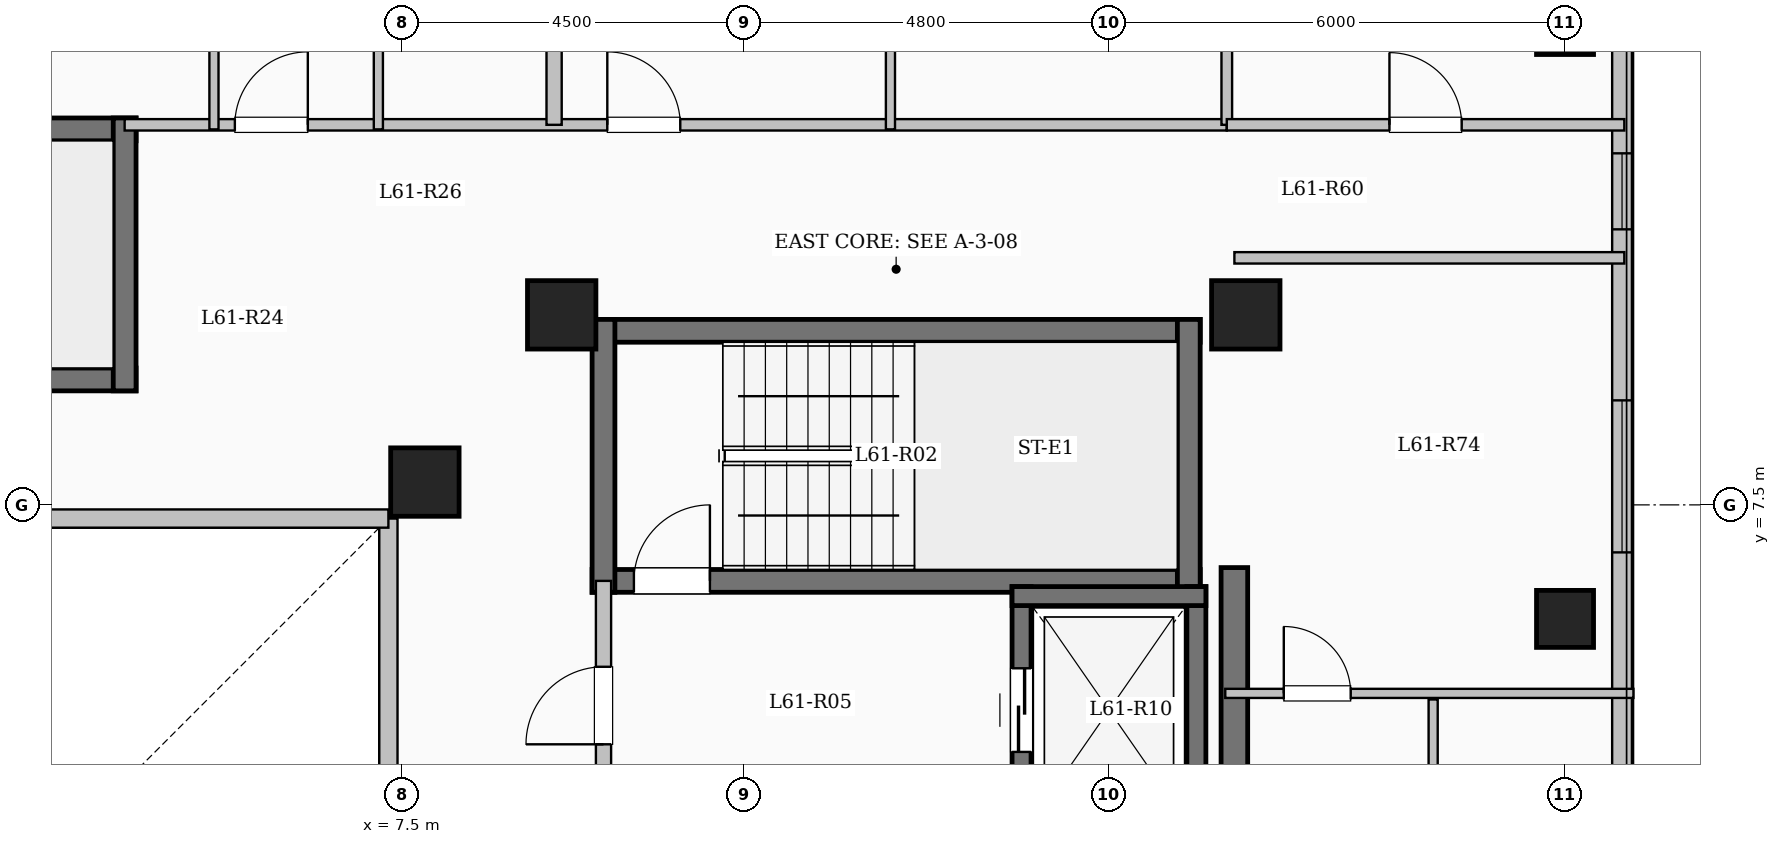
"""IFC4 building model, lengths in metres.
Left out: names, types, materials, properties, quantities, classifications, styles, units other than length and angle.
Written with IfcOpenShell. Run it as: python <this file> out.ifc"""

import sys

from ifc_helpers import new_model, si_unit, direction, frame, frame_2d, origin, origin_2d, place, context, subcontext, project, spatial, rectangle, extrude, element, fill, save


model = new_model("IFC4")
c1 = context("Model", 3, precision=1e-05, world=origin(), true_north=direction((0.0, 1.0)))
c2 = subcontext(c1, "Body", "Model", "MODEL_VIEW")
j1 = project(units=[si_unit("LENGTHUNIT", "METRE"), si_unit("PLANEANGLEUNIT", "RADIAN")], contexts=[c1])
p1 = place(None, origin())
s1 = spatial("IfcSite", under=j1, at=p1, CompositionType="ELEMENT")
p2 = place(p1, origin())
s2 = spatial("IfcBuilding", under=s1, at=p2, CompositionType="ELEMENT")
p3 = place(p2, frame((0.0, 0.0, 223.75)))
s3 = spatial("IfcBuildingStorey", under=s2, at=p3, CompositionType="ELEMENT", Elevation=223.75)
for number, where, z_axis, x_axis in (
    (1, (7.8, 7.8, 0.0), (0.0, 0.0, 1.0), (1.0, 0.0, 0.0)),
    (2, (9.6, 10.0, 0.0), (0.0, 0.0, 1.0), (1.0, 0.0, 0.0)),
    (3, (18.6, 10.0, 0.0), (0.0, 0.0, 1.0), (1.0, 0.0, 0.0)),
):
    element("IfcColumn", number, at=place(p3, frame(where, z_axis=z_axis, x_axis=x_axis)), inside=s3, PredefinedType="COLUMN", context=c2, shape_type="SweptSolid", body=[
        extrude(rectangle(XDim=0.9, YDim=0.9, at=origin_2d()), origin(), (0.0, 0.0, 1.0), 3.35),
    ])
for number, where, z_axis, x_axis in (
    (4, (22.8, 6.0, 0.0), (0.0, 0.0, 1.0), (1.0, 0.0, 0.0)),
    (5, (22.8, 13.8, 0.0), (0.0, 0.0, 1.0), (1.0, 0.0, 0.0)),
):
    element("IfcColumn", number, at=place(p3, frame(where, z_axis=z_axis, x_axis=x_axis)), inside=s3, PredefinedType="COLUMN", context=c2, shape_type="SweptSolid", body=[
        extrude(rectangle(XDim=0.75, YDim=0.75, at=origin_2d()), origin(), (0.0, 0.0, 1.0), 3.35),
    ])
p4 = place(p3, frame((7.32, -7.32, 0.0), z_axis=(0.0, 0.0, 1.0), x_axis=(0.0, 1.0, 0.0)))
e6 = element("IfcWall", 6, at=p4, inside=s3, PredefinedType="SOLIDWALL", context=c2, shape_type="SweptSolid", body=[
    extrude(rectangle(XDim=14.64, YDim=0.24, at=frame_2d((7.32, 0.0))), origin(), (0.0, 0.0, 1.0), 3.05),
])
p5 = place(p4, frame((6.62, 0.0, 0.95)))
e7 = element("IfcOpeningElement", 7, at=p5, cuts=e6, PredefinedType="OPENING", context=c2, shape_type="SweptSolid", body=[
    extrude(rectangle(XDim=1.4, YDim=1.5, at=frame_2d((0.7, 0.75))), frame((0.0, 0.13, 0.0), z_axis=(0.0, -1.0, 0.0), x_axis=(1.0, 0.0, 0.0)), (0.0, 0.0, 1.0), 0.26),
])
p6 = place(p3, frame((7.32, 7.32, 0.0), z_axis=(0.0, 0.0, 1.0), x_axis=(-1.0, 0.0, 0.0)))
e8 = element("IfcWall", 8, at=p6, inside=s3, PredefinedType="SOLIDWALL", context=c2, shape_type="SweptSolid", body=[
    extrude(rectangle(XDim=14.64, YDim=0.24, at=frame_2d((7.32, 0.0))), origin(), (0.0, 0.0, 1.0), 3.05),
])
p7 = place(p6, frame((6.62, 0.0, 0.95)))
e9 = element("IfcOpeningElement", 9, at=p7, cuts=e8, PredefinedType="OPENING", context=c2, shape_type="SweptSolid", body=[
    extrude(rectangle(XDim=1.4, YDim=1.5, at=frame_2d((0.7, 0.75))), frame((0.0, 0.13, 0.0), z_axis=(0.0, -1.0, 0.0), x_axis=(1.0, 0.0, 0.0)), (0.0, 0.0, 1.0), 0.26),
])
p8 = place(p3, frame((23.55, 17.25, 0.0), z_axis=(0.0, 0.0, 1.0), x_axis=(0.0, -1.0, 0.0)))
e10 = element("IfcWall", 10, at=p8, inside=s3, PredefinedType="SOLIDWALL", context=c2, shape_type="SweptSolid", body=[
    extrude(rectangle(XDim=34.5, YDim=0.26, at=frame_2d((17.25, 0.0))), origin(), (0.0, 0.0, 1.0), 3.05),
])
p9 = place(p8, frame((1.375, 0.0, 0.9)))
e11 = element("IfcOpeningElement", 11, at=p9, cuts=e10, PredefinedType="OPENING", context=c2, shape_type="SweptSolid", body=[
    extrude(rectangle(XDim=2.0, YDim=1.7, at=frame_2d((1.0, 0.85))), frame((0.0, 0.14, 0.0), z_axis=(0.0, -1.0, 0.0), x_axis=(1.0, 0.0, 0.0)), (0.0, 0.0, 1.0), 0.28),
])
p10 = place(p8, frame((5.125, 0.0, 0.95)))
e12 = element("IfcOpeningElement", 12, at=p10, cuts=e10, PredefinedType="OPENING", context=c2, shape_type="SweptSolid", body=[
    extrude(rectangle(XDim=1.0, YDim=1.5, at=frame_2d((0.5, 0.75))), frame((0.0, 0.14, 0.0), z_axis=(0.0, -1.0, 0.0), x_axis=(1.0, 0.0, 0.0)), (0.0, 0.0, 1.0), 0.28),
])
p11 = place(p8, frame((8.375, 0.0, 0.9)))
e13 = element("IfcOpeningElement", 13, at=p11, cuts=e10, PredefinedType="OPENING", context=c2, shape_type="SweptSolid", body=[
    extrude(rectangle(XDim=2.0, YDim=1.7, at=frame_2d((1.0, 0.85))), frame((0.0, 0.14, 0.0), z_axis=(0.0, -1.0, 0.0), x_axis=(1.0, 0.0, 0.0)), (0.0, 0.0, 1.0), 0.28),
])
p12 = place(p8, frame((13.2, 0.0, 0.9)))
e14 = element("IfcOpeningElement", 14, at=p12, cuts=e10, PredefinedType="OPENING", context=c2, shape_type="SweptSolid", body=[
    extrude(rectangle(XDim=1.65, YDim=1.6, at=frame_2d((0.825, 0.8))), frame((0.0, 0.14, 0.0), z_axis=(0.0, -1.0, 0.0), x_axis=(1.0, 0.0, 0.0)), (0.0, 0.0, 1.0), 0.28),
])
p13 = place(p8, frame((19.05, 0.0, 0.9)))
e15 = element("IfcOpeningElement", 15, at=p13, cuts=e10, PredefinedType="OPENING", context=c2, shape_type="SweptSolid", body=[
    extrude(rectangle(XDim=2.2, YDim=1.75, at=frame_2d((1.1, 0.875))), frame((0.0, 0.14, 0.0), z_axis=(0.0, -1.0, 0.0), x_axis=(1.0, 0.0, 0.0)), (0.0, 0.0, 1.0), 0.28),
])
p14 = place(p8, frame((24.975, 0.0, 0.95)))
e16 = element("IfcOpeningElement", 16, at=p14, cuts=e10, PredefinedType="OPENING", context=c2, shape_type="SweptSolid", body=[
    extrude(rectangle(XDim=1.2, YDim=1.5, at=frame_2d((0.6, 0.75))), frame((0.0, 0.14, 0.0), z_axis=(0.0, -1.0, 0.0), x_axis=(1.0, 0.0, 0.0)), (0.0, 0.0, 1.0), 0.28),
])
p15 = place(p8, frame((29.475, 0.0, 0.9)))
e17 = element("IfcOpeningElement", 17, at=p15, cuts=e10, PredefinedType="OPENING", context=c2, shape_type="SweptSolid", body=[
    extrude(rectangle(XDim=2.2, YDim=1.75, at=frame_2d((1.1, 0.875))), frame((0.0, 0.14, 0.0), z_axis=(0.0, -1.0, 0.0), x_axis=(1.0, 0.0, 0.0)), (0.0, 0.0, 1.0), 0.28),
])
p16 = place(p3, frame((10.0, 9.79, 0.0), z_axis=(0.0, 0.0, 1.0), x_axis=(1.0, 0.0, 0.0)))
e18 = element("IfcWall", 18, at=p16, inside=s3, PredefinedType="SHEAR", context=c2, shape_type="SweptSolid", body=[
    extrude(rectangle(XDim=8.0, YDim=0.3, at=frame_2d((4.0, 0.0))), origin(), (0.0, 0.0, 1.0), 3.35),
])
p17 = place(p3, frame((10.0, 6.5, 0.0), z_axis=(0.0, 0.0, 1.0), x_axis=(1.0, 0.0, 0.0)))
e19 = element("IfcWall", 19, at=p17, inside=s3, PredefinedType="SHEAR", context=c2, shape_type="SweptSolid", body=[
    extrude(rectangle(XDim=8.0, YDim=0.3, at=frame_2d((4.0, 0.0))), origin(), (0.0, 0.0, 1.0), 3.35),
])
p18 = place(p17, frame((0.55, 0.0, 0.0)))
e20 = element("IfcOpeningElement", 20, at=p18, cuts=e19, PredefinedType="OPENING", context=c2, shape_type="SweptSolid", body=[
    extrude(rectangle(XDim=1.0, YDim=2.15, at=frame_2d((0.5, 1.075))), frame((0.0, 0.16, 0.0), z_axis=(0.0, -1.0, 0.0), x_axis=(1.0, 0.0, 0.0)), (0.0, 0.0, 1.0), 0.32),
])
for number, where, z_axis, x_axis in (
    (21, (10.15, 6.35, 0.0), (0.0, 0.0, 1.0), (0.0, 1.0, 0.0)),
    (22, (17.85, 6.35, 0.0), (0.0, 0.0, 1.0), (0.0, 1.0, 0.0)),
):
    element("IfcWall", number, at=place(p3, frame(where, z_axis=z_axis, x_axis=x_axis)), inside=s3, PredefinedType="SHEAR", context=c2, shape_type="SweptSolid", body=[
        extrude(rectangle(XDim=3.59, YDim=0.3, at=frame_2d((1.795, 0.0))), origin(), (0.0, 0.0, 1.0), 3.35),
    ])
p19 = place(p3, frame((-4.0, 12.44, 0.0), z_axis=(0.0, 0.0, 1.0), x_axis=(1.0, 0.0, 0.0)))
e23 = element("IfcWall", 23, at=p19, inside=s3, PredefinedType="SHEAR", context=c2, shape_type="SweptSolid", body=[
    extrude(rectangle(XDim=8.0, YDim=0.3, at=frame_2d((4.0, 0.0))), origin(), (0.0, 0.0, 1.0), 3.35),
])
p20 = place(p3, frame((-4.0, 9.15, 0.0), z_axis=(0.0, 0.0, 1.0), x_axis=(1.0, 0.0, 0.0)))
e24 = element("IfcWall", 24, at=p20, inside=s3, PredefinedType="SHEAR", context=c2, shape_type="SweptSolid", body=[
    extrude(rectangle(XDim=8.0, YDim=0.3, at=frame_2d((4.0, 0.0))), origin(), (0.0, 0.0, 1.0), 3.35),
])
p21 = place(p20, frame((0.55, 0.0, 0.0)))
e25 = element("IfcOpeningElement", 25, at=p21, cuts=e24, PredefinedType="OPENING", context=c2, shape_type="SweptSolid", body=[
    extrude(rectangle(XDim=1.0, YDim=2.15, at=frame_2d((0.5, 1.075))), frame((0.0, 0.16, 0.0), z_axis=(0.0, -1.0, 0.0), x_axis=(1.0, 0.0, 0.0)), (0.0, 0.0, 1.0), 0.32),
])
p22 = place(p3, frame((3.85, 9.0, 0.0), z_axis=(0.0, 0.0, 1.0), x_axis=(0.0, 1.0, 0.0)))
e26 = element("IfcWall", 26, at=p22, inside=s3, PredefinedType="SHEAR", context=c2, shape_type="SweptSolid", body=[
    extrude(rectangle(XDim=3.59, YDim=0.3, at=frame_2d((1.795, 0.0))), origin(), (0.0, 0.0, 1.0), 3.35),
])
p23 = place(p3, frame((10.15, 3.25, 0.0), z_axis=(0.0, 0.0, 1.0), x_axis=(0.0, 1.0, 0.0)))
e27 = element("IfcWall", 27, at=p23, inside=s3, PredefinedType="SOLIDWALL", context=c2, shape_type="SweptSolid", body=[
    extrude(rectangle(XDim=3.25, YDim=0.2, at=frame_2d((1.625, 0.0))), origin(), (0.0, 0.0, 1.0), 3.05),
])
p24 = place(p23, frame((1.1, 0.0, 0.0)))
e28 = element("IfcOpeningElement", 28, at=p24, cuts=e27, PredefinedType="OPENING", context=c2, shape_type="SweptSolid", body=[
    extrude(rectangle(XDim=1.02, YDim=2.15, at=frame_2d((0.51, 1.075))), frame((0.0, 0.11, 0.0), z_axis=(0.0, -1.0, 0.0), x_axis=(1.0, 0.0, 0.0)), (0.0, 0.0, 1.0), 0.22),
])
p25 = place(p3, frame((15.65, 3.175, 0.0), z_axis=(0.0, 0.0, 1.0), x_axis=(0.0, 1.0, 0.0)))
e29 = element("IfcWall", 29, at=p25, inside=s3, PredefinedType="SHEAR", context=c2, shape_type="SweptSolid", body=[
    extrude(rectangle(XDim=3.25, YDim=0.25, at=frame_2d((1.625, 0.0))), origin(), (0.0, 0.0, 1.0), 3.35),
])
p26 = place(p25, frame((1.075, 0.0, 0.0)))
e30 = element("IfcOpeningElement", 30, at=p26, cuts=e29, PredefinedType="OPENING", context=c2, shape_type="SweptSolid", body=[
    extrude(rectangle(XDim=1.1, YDim=2.15, at=frame_2d((0.55, 1.075))), frame((0.0, 0.135, 0.0), z_axis=(0.0, -1.0, 0.0), x_axis=(1.0, 0.0, 0.0)), (0.0, 0.0, 1.0), 0.27),
])
p27 = place(p3, frame((17.95, 3.175, 0.0), z_axis=(0.0, 0.0, 1.0), x_axis=(0.0, 1.0, 0.0)))
e31 = element("IfcWall", 31, at=p27, inside=s3, PredefinedType="SHEAR", context=c2, shape_type="SweptSolid", body=[
    extrude(rectangle(XDim=3.25, YDim=0.25, at=frame_2d((1.625, 0.0))), origin(), (0.0, 0.0, 1.0), 3.35),
])
p28 = place(p3, frame((15.525, 6.3, 0.0), z_axis=(0.0, 0.0, 1.0), x_axis=(1.0, 0.0, 0.0)))
e32 = element("IfcWall", 32, at=p28, inside=s3, PredefinedType="SHEAR", context=c2, shape_type="SweptSolid", body=[
    extrude(rectangle(XDim=2.55, YDim=0.25, at=frame_2d((1.275, 0.0))), origin(), (0.0, 0.0, 1.0), 3.35),
])
p29 = place(p3, frame((18.45, -7.375, 0.0), z_axis=(0.0, 0.0, 1.0), x_axis=(0.0, 1.0, 0.0)))
e33 = element("IfcWall", 33, at=p29, inside=s3, PredefinedType="SHEAR", context=c2, shape_type="SweptSolid", body=[
    extrude(rectangle(XDim=14.05, YDim=0.35, at=frame_2d((7.025, 0.0))), origin(), (0.0, 0.0, 1.0), 3.35),
])
p30 = place(p3, frame((3.85, 12.5, 0.0), z_axis=(0.0, 0.0, 1.0), x_axis=(1.0, 0.0, 0.0)))
e34 = element("IfcWall", 34, at=p30, inside=s3, PredefinedType="PARTITIONING", context=c2, shape_type="SweptSolid", body=[
    extrude(rectangle(XDim=14.5, YDim=0.15, at=frame_2d((7.25, 0.0))), origin(), (0.0, 0.0, 1.0), 3.05),
])
p31 = place(p30, frame((1.45, 0.0, 0.0)))
e35 = element("IfcOpeningElement", 35, at=p31, cuts=e34, PredefinedType="OPENING", context=c2, shape_type="SweptSolid", body=[
    extrude(rectangle(XDim=0.96, YDim=2.15, at=frame_2d((0.48, 1.075))), frame((0.0, 0.085, 0.0), z_axis=(0.0, -1.0, 0.0), x_axis=(1.0, 0.0, 0.0)), (0.0, 0.0, 1.0), 0.17),
])
p32 = place(p30, frame((6.35, 0.0, 0.0)))
e36 = element("IfcOpeningElement", 36, at=p32, cuts=e34, PredefinedType="OPENING", context=c2, shape_type="SweptSolid", body=[
    extrude(rectangle(XDim=0.96, YDim=2.15, at=frame_2d((0.48, 1.075))), frame((0.0, 0.085, 0.0), z_axis=(0.0, -1.0, 0.0), x_axis=(1.0, 0.0, 0.0)), (0.0, 0.0, 1.0), 0.17),
])
p33 = place(p3, frame((9.5, 12.5, 0.0), z_axis=(0.0, 0.0, 1.0), x_axis=(0.0, 1.0, 0.0)))
e37 = element("IfcWall", 37, at=p33, inside=s3, PredefinedType="SOLIDWALL", context=c2, shape_type="SweptSolid", body=[
    extrude(rectangle(XDim=8.77, YDim=0.2, at=frame_2d((4.385, 0.0))), origin(), (0.0, 0.0, 1.0), 3.05),
])
p34 = place(p3, frame((5.025, 12.44, 0.0), z_axis=(0.0, 0.0, 1.0), x_axis=(0.0, 1.0, 0.0)))
e38 = element("IfcWall", 38, at=p34, inside=s3, PredefinedType="PARTITIONING", context=c2, shape_type="SweptSolid", body=[
    extrude(rectangle(XDim=9.934, YDim=0.12, at=frame_2d((4.967, 0.0))), origin(), (0.0, 0.0, 1.0), 3.05),
])
p35 = place(p34, frame((3.245, 0.0, 0.0)))
e39 = element("IfcOpeningElement", 39, at=p35, cuts=e38, PredefinedType="OPENING", context=c2, shape_type="SweptSolid", body=[
    extrude(rectangle(XDim=1.08, YDim=2.15, at=frame_2d((0.54, 1.075))), frame((0.0, 0.07, 0.0), z_axis=(0.0, -1.0, 0.0), x_axis=(1.0, 0.0, 0.0)), (0.0, 0.0, 1.0), 0.14),
])
p36 = place(p3, frame((7.188, 12.44, 0.0), z_axis=(0.0, 0.0, 1.0), x_axis=(0.0, 1.0, 0.0)))
e40 = element("IfcWall", 40, at=p36, inside=s3, PredefinedType="PARTITIONING", context=c2, shape_type="SweptSolid", body=[
    extrude(rectangle(XDim=2.96, YDim=0.12, at=frame_2d((1.48, 0.0))), origin(), (0.0, 0.0, 1.0), 2.535),
])
p37 = place(p3, frame((13.925, 12.44, 0.0), z_axis=(0.0, 0.0, 1.0), x_axis=(0.0, 1.0, 0.0)))
e41 = element("IfcWall", 41, at=p37, inside=s3, PredefinedType="PARTITIONING", context=c2, shape_type="SweptSolid", body=[
    extrude(rectangle(XDim=3.21, YDim=0.12, at=frame_2d((1.605, 0.0))), origin(), (0.0, 0.0, 1.0), 3.05),
])
p38 = place(p37, frame((1.195, 0.0, 0.0)))
e42 = element("IfcOpeningElement", 42, at=p38, cuts=e41, PredefinedType="OPENING", context=c2, shape_type="SweptSolid", body=[
    extrude(rectangle(XDim=0.88, YDim=2.1, at=frame_2d((0.44, 1.05))), frame((0.0, 0.07, 0.0), z_axis=(0.0, -1.0, 0.0), x_axis=(1.0, 0.0, 0.0)), (0.0, 0.0, 1.0), 0.14),
])
p39 = place(p3, frame((18.45, 10.75, 0.0), z_axis=(0.0, 0.0, 1.0), x_axis=(1.0, 0.0, 0.0)))
e43 = element("IfcWall", 43, at=p39, inside=s3, PredefinedType="PARTITIONING", context=c2, shape_type="SweptSolid", body=[
    extrude(rectangle(XDim=5.13, YDim=0.15, at=frame_2d((2.565, 0.0))), origin(), (0.0, 0.0, 1.0), 3.05),
])
p40 = place(p3, frame((18.35, 12.5, 0.0), z_axis=(0.0, 0.0, 1.0), x_axis=(0.0, 1.0, 0.0)))
e44 = element("IfcWall", 44, at=p40, inside=s3, PredefinedType="PARTITIONING", context=c2, shape_type="SweptSolid", body=[
    extrude(rectangle(XDim=4.75, YDim=0.14, at=frame_2d((2.375, 0.0))), origin(), (0.0, 0.0, 1.0), 3.05),
])
p41 = place(p3, frame((18.35, 12.5, 0.0), z_axis=(0.0, 0.0, 1.0), x_axis=(1.0, 0.0, 0.0)))
e45 = element("IfcWall", 45, at=p41, inside=s3, PredefinedType="PARTITIONING", context=c2, shape_type="SweptSolid", body=[
    extrude(rectangle(XDim=5.23, YDim=0.15, at=frame_2d((2.615, 0.0))), origin(), (0.0, 0.0, 1.0), 3.05),
])
p42 = place(p41, frame((2.14, 0.0, 0.0)))
e46 = element("IfcOpeningElement", 46, at=p42, cuts=e45, PredefinedType="OPENING", context=c2, shape_type="SweptSolid", body=[
    extrude(rectangle(XDim=0.95, YDim=2.15, at=frame_2d((0.475, 1.075))), frame((0.0, 0.085, 0.0), z_axis=(0.0, -1.0, 0.0), x_axis=(1.0, 0.0, 0.0)), (0.0, 0.0, 1.0), 0.17),
])
p43 = place(p3, frame((18.33, 5.02, 0.0), z_axis=(0.0, 0.0, 1.0), x_axis=(1.0, 0.0, 0.0)))
e47 = element("IfcWall", 47, at=p43, inside=s3, PredefinedType="PARTITIONING", context=c2, shape_type="SweptSolid", body=[
    extrude(rectangle(XDim=5.37, YDim=0.12, at=frame_2d((2.685, 0.0))), origin(), (0.0, 0.0, 1.0), 3.05),
])
p44 = place(p43, frame((0.77, 0.0, 0.0)))
e48 = element("IfcOpeningElement", 48, at=p44, cuts=e47, PredefinedType="OPENING", context=c2, shape_type="SweptSolid", body=[
    extrude(rectangle(XDim=0.88, YDim=2.1, at=frame_2d((0.44, 1.05))), frame((0.0, 0.07, 0.0), z_axis=(0.0, -1.0, 0.0), x_axis=(1.0, 0.0, 0.0)), (0.0, 0.0, 1.0), 0.14),
])
p45 = place(p3, frame((21.065, 1.36, 0.0), z_axis=(0.0, 0.0, 1.0), x_axis=(0.0, 1.0, 0.0)))
e49 = element("IfcWall", 49, at=p45, inside=s3, PredefinedType="PARTITIONING", context=c2, shape_type="SweptSolid", body=[
    extrude(rectangle(XDim=3.58, YDim=0.12, at=frame_2d((1.79, 0.0))), origin(), (0.0, 0.0, 1.0), 3.05),
])
p46 = place(p10, origin())
e50 = element("IfcWindow", 50, at=p46, inside=s3, PartitioningType="SINGLE_PANEL", PredefinedType="WINDOW", context=c2, shape_type="SweptSolid", body=[
    extrude(rectangle(XDim=1.0, YDim=1.5, at=frame_2d((0.5, 0.75))), frame((0.0, 0.03, 0.0), z_axis=(0.0, -1.0, 0.0), x_axis=(1.0, 0.0, 0.0)), (0.0, 0.0, 1.0), 0.06),
])
fill(e12, e50)
p47 = place(p11, origin())
e51 = element("IfcWindow", 51, at=p47, inside=s3, PartitioningType="SINGLE_PANEL", PredefinedType="WINDOW", context=c2, shape_type="SweptSolid", body=[
    extrude(rectangle(XDim=2.0, YDim=1.7, at=frame_2d((1.0, 0.85))), frame((0.0, 0.03, 0.0), z_axis=(0.0, -1.0, 0.0), x_axis=(1.0, 0.0, 0.0)), (0.0, 0.0, 1.0), 0.06),
])
fill(e13, e51)
p48 = place(p18, origin())
e52 = element("IfcDoor", 52, at=p48, inside=s3, OperationType="SINGLE_SWING_RIGHT", PredefinedType="DOOR", context=c2, shape_type="SweptSolid", body=[
    extrude(rectangle(XDim=1.0, YDim=2.15, at=frame_2d((0.5, 1.075))), frame((0.0, 0.025, 0.0), z_axis=(0.0, -1.0, 0.0), x_axis=(1.0, 0.0, 0.0)), (0.0, 0.0, 1.0), 0.05),
])
fill(e20, e52)
p49 = place(p24, origin())
e53 = element("IfcDoor", 53, at=p49, inside=s3, OperationType="SINGLE_SWING_LEFT", PredefinedType="DOOR", context=c2, shape_type="SweptSolid", body=[
    extrude(rectangle(XDim=1.02, YDim=2.15, at=frame_2d((0.51, 1.075))), frame((0.0, 0.025, 0.0), z_axis=(0.0, -1.0, 0.0), x_axis=(1.0, 0.0, 0.0)), (0.0, 0.0, 1.0), 0.05),
])
fill(e28, e53)
p50 = place(p26, origin())
e54 = element("IfcDoor", 54, at=p50, inside=s3, OperationType="SLIDING_TO_LEFT", PredefinedType="DOOR", context=c2, shape_type="SweptSolid", body=[
    extrude(rectangle(XDim=1.1, YDim=2.15, at=frame_2d((0.55, 1.075))), frame((0.0, 0.025, 0.0), z_axis=(0.0, -1.0, 0.0), x_axis=(1.0, 0.0, 0.0)), (0.0, 0.0, 1.0), 0.05),
])
fill(e30, e54)
p51 = place(p31, origin())
e55 = element("IfcDoor", 55, at=p51, inside=s3, OperationType="SINGLE_SWING_RIGHT", PredefinedType="DOOR", context=c2, shape_type="SweptSolid", body=[
    extrude(rectangle(XDim=0.96, YDim=2.15, at=frame_2d((0.48, 1.075))), frame((0.0, 0.025, 0.0), z_axis=(0.0, -1.0, 0.0), x_axis=(1.0, 0.0, 0.0)), (0.0, 0.0, 1.0), 0.05),
])
fill(e35, e55)
p52 = place(p32, origin())
e56 = element("IfcDoor", 56, at=p52, inside=s3, OperationType="SINGLE_SWING_LEFT", PredefinedType="DOOR", context=c2, shape_type="SweptSolid", body=[
    extrude(rectangle(XDim=0.96, YDim=2.15, at=frame_2d((0.48, 1.075))), frame((0.0, 0.025, 0.0), z_axis=(0.0, -1.0, 0.0), x_axis=(1.0, 0.0, 0.0)), (0.0, 0.0, 1.0), 0.05),
])
fill(e36, e56)
p53 = place(p42, origin())
e57 = element("IfcDoor", 57, at=p53, inside=s3, OperationType="SINGLE_SWING_LEFT", PredefinedType="DOOR", context=c2, shape_type="SweptSolid", body=[
    extrude(rectangle(XDim=0.95, YDim=2.15, at=frame_2d((0.475, 1.075))), frame((0.0, 0.025, 0.0), z_axis=(0.0, -1.0, 0.0), x_axis=(1.0, 0.0, 0.0)), (0.0, 0.0, 1.0), 0.05),
])
fill(e46, e57)
p54 = place(p44, origin())
e58 = element("IfcDoor", 58, at=p54, inside=s3, OperationType="SINGLE_SWING_LEFT", PredefinedType="DOOR", context=c2, shape_type="SweptSolid", body=[
    extrude(rectangle(XDim=0.88, YDim=2.1, at=frame_2d((0.44, 1.05))), frame((0.0, 0.025, 0.0), z_axis=(0.0, -1.0, 0.0), x_axis=(1.0, 0.0, 0.0)), (0.0, 0.0, 1.0), 0.05),
])
fill(e48, e58)
save(model, sys.argv[1])
